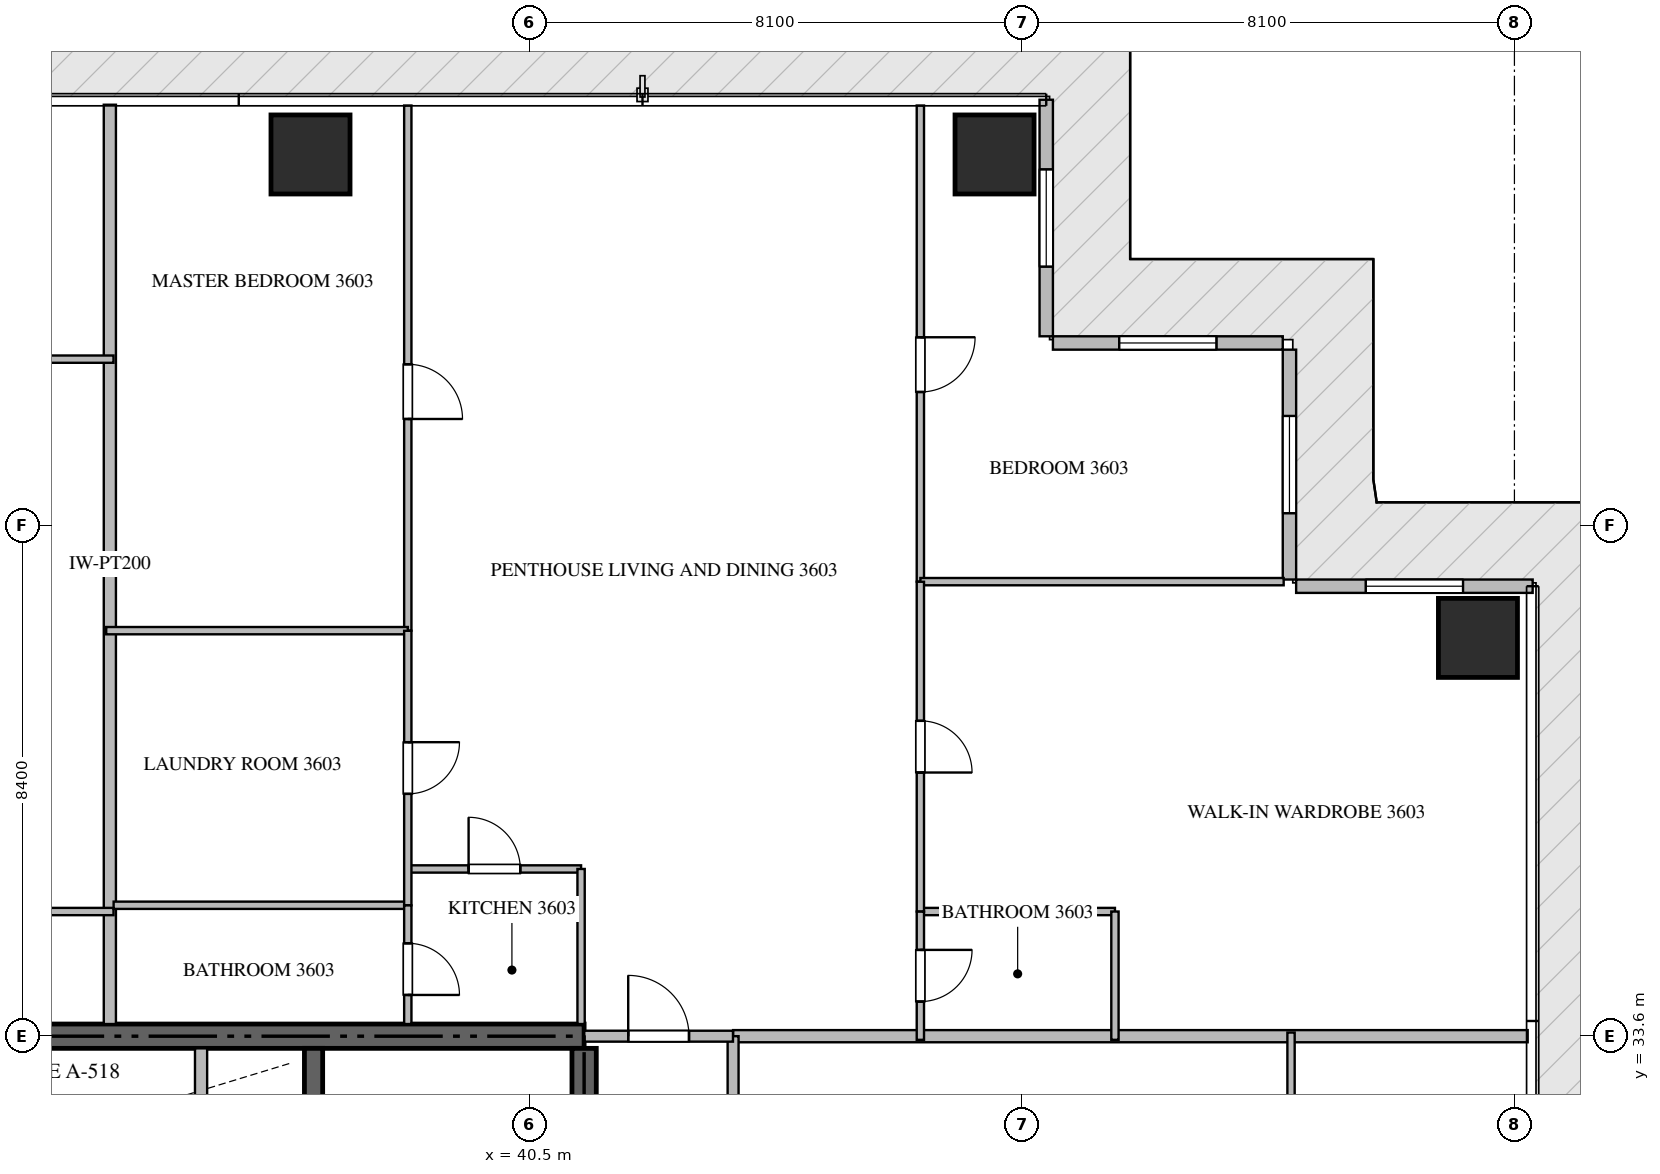
"""IFC4 building model, lengths in metres.
Left out: names, types, materials, properties, quantities, classifications, styles, units other than length and angle.
Written with IfcOpenShell. Run it as: python <this file> out.ifc"""

import sys

from ifc_helpers import new_model, si_unit, direction, frame, frame_2d, origin, origin_2d, place, context, subcontext, project, spatial, rectangle, extrude, source, transform, mapped, element, fill, save


model = new_model("IFC4")
c1 = context("Model", 3, precision=1e-05, world=origin(), true_north=direction((0.0, 1.0)))
c2 = subcontext(c1, "Body", "Model", "MODEL_VIEW")
j1 = project(units=[si_unit("LENGTHUNIT", "METRE"), si_unit("PLANEANGLEUNIT", "RADIAN")], contexts=[c1])
p1 = place(None, origin())
s1 = spatial("IfcSite", under=j1, at=p1, CompositionType="ELEMENT")
p2 = place(p1, origin())
s2 = spatial("IfcBuilding", under=s1, at=p2, CompositionType="ELEMENT")
p3 = place(p2, frame((0.0, 0.0, 146.4)))
s3 = spatial("IfcBuildingStorey", under=s2, at=p3, CompositionType="ELEMENT", Elevation=146.4)
p4 = place(p3, frame((41.4, 33.6, -0.26), z_axis=(0.0, 0.0, 1.0), x_axis=(-1.0, 0.0, 0.0)))
e1 = element("IfcWall", 1, at=p4, inside=s3, PredefinedType="SHEAR", context=c2, shape_type="SweptSolid", body=[
    extrude(rectangle(XDim=18.0, YDim=0.4, at=frame_2d((9.0, 0.0))), origin(), (0.0, 0.0, 1.0), 3.748),
])
p5 = place(p3, frame((41.4, 27.75, -0.26), z_axis=(0.0, 0.0, 1.0), x_axis=(0.0, 1.0, 0.0)))
e2 = element("IfcWall", 2, at=p5, inside=s3, PredefinedType="SHEAR", context=c2, shape_type="SweptSolid", body=[
    extrude(rectangle(XDim=5.65, YDim=0.4, at=frame_2d((2.825, 0.0))), origin(), (0.0, 0.0, 1.0), 3.748),
])
p6 = place(p3, frame((36.95, 27.05, -0.26), z_axis=(0.0, 0.0, 1.0), x_axis=(0.0, 1.0, 0.0)))
e3 = element("IfcWall", 3, at=p6, inside=s3, PredefinedType="SHEAR", context=c2, shape_type="SweptSolid", body=[
    extrude(rectangle(XDim=6.35, YDim=0.3, at=frame_2d((3.175, 0.0))), origin(), (0.0, 0.0, 1.0), 3.748),
])
m1 = source(origin(), c2, "Body", "SweptSolid", [
    extrude(rectangle(XDim=1.3, YDim=1.3, at=origin_2d()), origin(), (0.0, 0.0, 1.0), 3.75),
])
for number, where, z_axis, x_axis in (
    (4, (36.9, 48.1, -0.26), (0.0, 0.0, 1.0), (1.0, 0.0, 0.0)),
    (5, (48.15, 48.1, -0.26), (0.0, 0.0, 1.0), (1.0, 0.0, 0.0)),
    (6, (56.1, 40.15, -0.26), (0.0, 0.0, 1.0), (1.0, 0.0, 0.0)),
):
    element("IfcColumn", number, at=place(p3, frame(where, z_axis=z_axis, x_axis=x_axis)), inside=s3, PredefinedType="COLUMN", context=c2, shape_type="MappedRepresentation", body=[
        mapped(m1, transform((0.0, 0.0, 0.0), scale=1.0)),
    ])
p7 = place(p3, frame((57.0, 41.0, 0.0), z_axis=(0.0, 0.0, 1.0), x_axis=(-1.0, 0.0, 0.0)))
e7 = element("IfcWall", 7, at=p7, inside=s3, PredefinedType="ELEMENTEDWALL", context=c2, shape_type="SweptSolid", body=[
    extrude(rectangle(XDim=3.89, YDim=0.22, at=frame_2d((1.945, 0.0))), origin(), (0.0, 0.0, 1.0), 3.475),
])
p8 = place(p7, frame((1.145, 0.0, 0.65)))
e8 = element("IfcOpeningElement", 8, at=p8, cuts=e7, PredefinedType="OPENING", context=c2, shape_type="SweptSolid", body=[
    extrude(rectangle(XDim=1.6, YDim=2.1, at=frame_2d((0.8, 1.05))), frame((0.0, 0.12, 0.0), z_axis=(0.0, -1.0, 0.0), x_axis=(1.0, 0.0, 0.0)), (0.0, 0.0, 1.0), 0.24),
])
p9 = place(p3, frame((53.0, 41.11, 0.0), z_axis=(0.0, 0.0, 1.0), x_axis=(0.0, 1.0, 0.0)))
e9 = element("IfcWall", 9, at=p9, inside=s3, PredefinedType="ELEMENTEDWALL", context=c2, shape_type="SweptSolid", body=[
    extrude(rectangle(XDim=3.78, YDim=0.22, at=frame_2d((1.89, 0.0))), origin(), (0.0, 0.0, 1.0), 3.475),
])
p10 = place(p9, frame((1.09, 0.0, 0.65)))
e10 = element("IfcOpeningElement", 10, at=p10, cuts=e9, PredefinedType="OPENING", context=c2, shape_type="SweptSolid", body=[
    extrude(rectangle(XDim=1.6, YDim=2.1, at=frame_2d((0.8, 1.05))), frame((0.0, 0.12, 0.0), z_axis=(0.0, -1.0, 0.0), x_axis=(1.0, 0.0, 0.0)), (0.0, 0.0, 1.0), 0.24),
])
p11 = place(p3, frame((52.89, 45.0, 0.0), z_axis=(0.0, 0.0, 1.0), x_axis=(-1.0, 0.0, 0.0)))
e11 = element("IfcWall", 11, at=p11, inside=s3, PredefinedType="ELEMENTEDWALL", context=c2, shape_type="SweptSolid", body=[
    extrude(rectangle(XDim=3.78, YDim=0.22, at=frame_2d((1.89, 0.0))), origin(), (0.0, 0.0, 1.0), 3.475),
])
p12 = place(p11, frame((1.09, 0.0, 0.65)))
e12 = element("IfcOpeningElement", 12, at=p12, cuts=e11, PredefinedType="OPENING", context=c2, shape_type="SweptSolid", body=[
    extrude(rectangle(XDim=1.6, YDim=2.1, at=frame_2d((0.8, 1.05))), frame((0.0, 0.12, 0.0), z_axis=(0.0, -1.0, 0.0), x_axis=(1.0, 0.0, 0.0)), (0.0, 0.0, 1.0), 0.24),
])
p13 = place(p3, frame((49.0, 45.11, 0.0), z_axis=(0.0, 0.0, 1.0), x_axis=(0.0, 1.0, 0.0)))
e13 = element("IfcWall", 13, at=p13, inside=s3, PredefinedType="ELEMENTEDWALL", context=c2, shape_type="SweptSolid", body=[
    extrude(rectangle(XDim=3.89, YDim=0.22, at=frame_2d((1.945, 0.0))), origin(), (0.0, 0.0, 1.0), 3.475),
])
p14 = place(p13, frame((1.145, 0.0, 0.65)))
e14 = element("IfcOpeningElement", 14, at=p14, cuts=e13, PredefinedType="OPENING", context=c2, shape_type="SweptSolid", body=[
    extrude(rectangle(XDim=1.6, YDim=2.1, at=frame_2d((0.8, 1.05))), frame((0.0, 0.12, 0.0), z_axis=(0.0, -1.0, 0.0), x_axis=(1.0, 0.0, 0.0)), (0.0, 0.0, 1.0), 0.24),
])
p15 = place(p3, frame((35.1, 30.75, 0.0), z_axis=(0.0, 0.0, 1.0), x_axis=(0.0, 1.0, 0.0)))
e15 = element("IfcWall", 15, at=p15, inside=s3, PredefinedType="STANDARD", context=c2, shape_type="SweptSolid", body=[
    extrude(rectangle(XDim=2.65, YDim=0.2, at=frame_2d((1.325, 0.0))), origin(), (0.0, 0.0, 1.0), 3.49),
])
p16 = place(p3, frame((33.6, 33.8, 0.0), z_axis=(0.0, 0.0, 1.0), x_axis=(0.0, 1.0, 0.0)))
e16 = element("IfcWall", 16, at=p16, inside=s3, PredefinedType="PARTITIONING", context=c2, shape_type="SweptSolid", body=[
    extrude(rectangle(XDim=15.118, YDim=0.2, at=frame_2d((7.559, 0.0))), origin(), (0.0, 0.0, 1.0), 3.49),
])
p17 = place(p3, frame((43.85, 33.6, 0.0), z_axis=(0.0, 0.0, 1.0), x_axis=(1.0, 0.0, 0.0)))
e17 = element("IfcWall", 17, at=p17, inside=s3, PredefinedType="PARTITIONING", context=c2, shape_type="SweptSolid", body=[
    extrude(rectangle(XDim=13.068, YDim=0.2, at=frame_2d((6.534, 0.0))), origin(), (0.0, 0.0, 1.0), 3.49),
])
p18 = place(p3, frame((43.85, 14.9, 0.0), z_axis=(0.0, 0.0, 1.0), x_axis=(0.0, 1.0, 0.0)))
e18 = element("IfcWall", 18, at=p18, inside=s3, PredefinedType="PARTITIONING", context=c2, shape_type="SweptSolid", body=[
    extrude(rectangle(XDim=18.7, YDim=0.18, at=frame_2d((9.35, 0.0))), origin(), (0.0, 0.0, 1.0), 3.49),
])
p19 = place(p18, frame((1.805, 0.0, 0.0)))
e19 = element("IfcOpeningElement", 19, at=p19, cuts=e18, PredefinedType="OPENING", context=c2, shape_type="SweptSolid", body=[
    extrude(rectangle(XDim=1.0, YDim=2.15, at=frame_2d((0.5, 1.075))), frame((0.0, 0.1, 0.0), z_axis=(0.0, -1.0, 0.0), x_axis=(1.0, 0.0, 0.0)), (0.0, 0.0, 1.0), 0.2),
])
p20 = place(p3, frame((41.402, 33.6, 0.0), z_axis=(0.0, 0.0, 1.0), x_axis=(1.0, 0.0, 0.0)))
e20 = element("IfcWall", 20, at=p20, inside=s3, PredefinedType="PARTITIONING", context=c2, shape_type="SweptSolid", body=[
    extrude(rectangle(XDim=2.446, YDim=0.18, at=frame_2d((1.223, 0.0))), origin(), (0.0, 0.0, 1.0), 3.49),
])
p21 = place(p20, frame((0.723, 0.0, 0.0)))
e21 = element("IfcOpeningElement", 21, at=p21, cuts=e20, PredefinedType="OPENING", context=c2, shape_type="SweptSolid", body=[
    extrude(rectangle(XDim=1.0, YDim=2.15, at=frame_2d((0.5, 1.075))), frame((0.0, 0.1, 0.0), z_axis=(0.0, -1.0, 0.0), x_axis=(1.0, 0.0, 0.0)), (0.0, 0.0, 1.0), 0.2),
])
for number, where, z_axis, x_axis in (
    (22, (26.3, 44.734, 0.0), (0.0, 0.0, 1.0), (1.0, 0.0, 0.0)),
    (23, (26.3, 35.65, 0.0), (0.0, 0.0, 1.0), (1.0, 0.0, 0.0)),
):
    element("IfcWall", number, at=place(p3, frame(where, z_axis=z_axis, x_axis=x_axis)), inside=s3, PredefinedType="PARTITIONING", context=c2, shape_type="SweptSolid", body=[
        extrude(rectangle(XDim=7.36, YDim=0.12, at=frame_2d((3.68, 0.0))), origin(), (0.0, 0.0, 1.0), 3.49),
    ])
p22 = place(p3, frame((38.5, 36.35, 0.0), z_axis=(0.0, 0.0, 1.0), x_axis=(1.0, 0.0, 0.0)))
e24 = element("IfcWall", 24, at=p22, inside=s3, PredefinedType="PARTITIONING", context=c2, shape_type="SweptSolid", body=[
    extrude(rectangle(XDim=2.85, YDim=0.12, at=frame_2d((1.425, 0.0))), origin(), (0.0, 0.0, 1.0), 3.49),
])
p23 = place(p22, frame((1.0, 0.0, 0.0)))
e25 = element("IfcOpeningElement", 25, at=p23, cuts=e24, PredefinedType="OPENING", context=c2, shape_type="SweptSolid", body=[
    extrude(rectangle(XDim=0.85, YDim=2.1, at=frame_2d((0.425, 1.05))), frame((0.0, 0.07, 0.0), z_axis=(0.0, -1.0, 0.0), x_axis=(1.0, 0.0, 0.0)), (0.0, 0.0, 1.0), 0.14),
])
p24 = place(p3, frame((41.35, 36.35, 0.0), z_axis=(0.0, 0.0, 1.0), x_axis=(0.0, -1.0, 0.0)))
e26 = element("IfcWall", 26, at=p24, inside=s3, PredefinedType="PARTITIONING", context=c2, shape_type="SweptSolid", body=[
    extrude(rectangle(XDim=2.55, YDim=0.12, at=frame_2d((1.275, 0.0))), origin(), (0.0, 0.0, 1.0), 3.49),
])
p25 = place(p3, frame((38.5, 48.905, 0.0), z_axis=(0.0, 0.0, 1.0), x_axis=(0.0, -1.0, 0.0)))
e27 = element("IfcWall", 27, at=p25, inside=s3, PredefinedType="PARTITIONING", context=c2, shape_type="SweptSolid", body=[
    extrude(rectangle(XDim=8.636, YDim=0.12, at=frame_2d((4.318, 0.0))), origin(), (0.0, 0.0, 1.0), 3.49),
])
p26 = place(p25, frame((4.255, 0.0, 0.0)))
e28 = element("IfcOpeningElement", 28, at=p26, cuts=e27, PredefinedType="OPENING", context=c2, shape_type="SweptSolid", body=[
    extrude(rectangle(XDim=0.9, YDim=2.1, at=frame_2d((0.45, 1.05))), frame((0.0, 0.07, 0.0), z_axis=(0.0, -1.0, 0.0), x_axis=(1.0, 0.0, 0.0)), (0.0, 0.0, 1.0), 0.14),
])
p27 = place(p3, frame((33.54, 40.269, 0.0), z_axis=(0.0, 0.0, 1.0), x_axis=(1.0, 0.0, 0.0)))
e29 = element("IfcWall", 29, at=p27, inside=s3, PredefinedType="PARTITIONING", context=c2, shape_type="SweptSolid", body=[
    extrude(rectangle(XDim=4.96, YDim=0.12, at=frame_2d((2.48, 0.0))), origin(), (0.0, 0.0, 1.0), 2.972),
])
p28 = place(p3, frame((33.662, 35.753, 0.0), z_axis=(0.0, 0.0, 1.0), x_axis=(1.0, 0.0, 0.0)))
e30 = element("IfcWall", 30, at=p28, inside=s3, PredefinedType="PARTITIONING", context=c2, shape_type="SweptSolid", body=[
    extrude(rectangle(XDim=4.838, YDim=0.12, at=frame_2d((2.419, 0.0))), origin(), (0.0, 0.0, 1.0), 3.49),
])
p29 = place(p3, frame((38.5, 40.267, 0.0), z_axis=(0.0, 0.0, 1.0), x_axis=(0.0, -1.0, 0.0)))
e31 = element("IfcWall", 31, at=p29, inside=s3, PredefinedType="PARTITIONING", context=c2, shape_type="SweptSolid", body=[
    extrude(rectangle(XDim=4.514, YDim=0.12, at=frame_2d((2.257, 0.0))), origin(), (0.0, 0.0, 1.0), 3.49),
])
p30 = place(p29, frame((1.832, 0.0, 0.0)))
e32 = element("IfcOpeningElement", 32, at=p30, cuts=e31, PredefinedType="OPENING", context=c2, shape_type="SweptSolid", body=[
    extrude(rectangle(XDim=0.85, YDim=2.1, at=frame_2d((0.425, 1.05))), frame((0.0, 0.07, 0.0), z_axis=(0.0, -1.0, 0.0), x_axis=(1.0, 0.0, 0.0)), (0.0, 0.0, 1.0), 0.14),
])
p31 = place(p3, frame((38.5, 35.751, 0.0), z_axis=(0.0, 0.0, 1.0), x_axis=(0.0, -1.0, 0.0)))
e33 = element("IfcWall", 33, at=p31, inside=s3, PredefinedType="PARTITIONING", context=c2, shape_type="SweptSolid", body=[
    extrude(rectangle(XDim=1.951, YDim=0.12, at=frame_2d((0.976, 0.0))), origin(), (0.0, 0.0, 1.0), 3.49),
])
p32 = place(p31, frame((0.623, 0.0, 0.0)))
e34 = element("IfcOpeningElement", 34, at=p32, cuts=e33, PredefinedType="OPENING", context=c2, shape_type="SweptSolid", body=[
    extrude(rectangle(XDim=0.85, YDim=2.1, at=frame_2d((0.425, 1.05))), frame((0.0, 0.07, 0.0), z_axis=(0.0, -1.0, 0.0), x_axis=(1.0, 0.0, 0.0)), (0.0, 0.0, 1.0), 0.14),
])
p33 = place(p3, frame((46.93, 48.905, 0.0), z_axis=(0.0, 0.0, 1.0), x_axis=(0.0, -1.0, 0.0)))
e35 = element("IfcWall", 35, at=p33, inside=s3, PredefinedType="PARTITIONING", context=c2, shape_type="SweptSolid", body=[
    extrude(rectangle(XDim=7.83, YDim=0.12, at=frame_2d((3.915, 0.0))), origin(), (0.0, 0.0, 1.0), 3.49),
])
p34 = place(p33, frame((3.811, 0.0, 0.0)))
e36 = element("IfcOpeningElement", 36, at=p34, cuts=e35, PredefinedType="OPENING", context=c2, shape_type="SweptSolid", body=[
    extrude(rectangle(XDim=0.9, YDim=2.1, at=frame_2d((0.45, 1.05))), frame((0.0, 0.07, 0.0), z_axis=(0.0, -1.0, 0.0), x_axis=(1.0, 0.0, 0.0)), (0.0, 0.0, 1.0), 0.14),
])
p35 = place(p3, frame((46.93, 41.075, 0.0), z_axis=(0.0, 0.0, 1.0), x_axis=(1.0, 0.0, 0.0)))
e37 = element("IfcWall", 37, at=p35, inside=s3, PredefinedType="PARTITIONING", context=c2, shape_type="SweptSolid", body=[
    extrude(rectangle(XDim=5.975, YDim=0.12, at=frame_2d((2.988, 0.0))), origin(), (0.0, 0.0, 1.0), 3.49),
])
p36 = place(p3, frame((46.93, 35.65, 0.0), z_axis=(0.0, 0.0, 1.0), x_axis=(1.0, 0.0, 0.0)))
e38 = element("IfcWall", 38, at=p36, inside=s3, PredefinedType="PARTITIONING", context=c2, shape_type="SweptSolid", body=[
    extrude(rectangle(XDim=3.2, YDim=0.12, at=frame_2d((1.6, 0.0))), origin(), (0.0, 0.0, 1.0), 3.49),
])
p37 = place(p3, frame((50.13, 35.65, 0.0), z_axis=(0.0, 0.0, 1.0), x_axis=(0.0, -1.0, 0.0)))
e39 = element("IfcWall", 39, at=p37, inside=s3, PredefinedType="PARTITIONING", context=c2, shape_type="SweptSolid", body=[
    extrude(rectangle(XDim=2.11, YDim=0.12, at=frame_2d((1.055, 0.0))), origin(), (0.0, 0.0, 1.0), 3.49),
])
p38 = place(p3, frame((46.93, 41.073, 0.0), z_axis=(0.0, 0.0, 1.0), x_axis=(0.0, -1.0, 0.0)))
e40 = element("IfcWall", 40, at=p38, inside=s3, PredefinedType="PARTITIONING", context=c2, shape_type="SweptSolid", body=[
    extrude(rectangle(XDim=5.423, YDim=0.12, at=frame_2d((2.711, 0.0))), origin(), (0.0, 0.0, 1.0), 3.49),
])
p39 = place(p38, frame((2.287, 0.0, 0.0)))
e41 = element("IfcOpeningElement", 41, at=p39, cuts=e40, PredefinedType="OPENING", context=c2, shape_type="SweptSolid", body=[
    extrude(rectangle(XDim=0.85, YDim=2.1, at=frame_2d((0.425, 1.05))), frame((0.0, 0.07, 0.0), z_axis=(0.0, -1.0, 0.0), x_axis=(1.0, 0.0, 0.0)), (0.0, 0.0, 1.0), 0.14),
])
p40 = place(p3, frame((46.93, 35.648, 0.0), z_axis=(0.0, 0.0, 1.0), x_axis=(0.0, -1.0, 0.0)))
e42 = element("IfcWall", 42, at=p40, inside=s3, PredefinedType="PARTITIONING", context=c2, shape_type="SweptSolid", body=[
    extrude(rectangle(XDim=2.108, YDim=0.12, at=frame_2d((1.054, 0.0))), origin(), (0.0, 0.0, 1.0), 3.49),
])
p41 = place(p40, frame((0.629, 0.0, 0.0)))
e43 = element("IfcOpeningElement", 43, at=p41, cuts=e42, PredefinedType="OPENING", context=c2, shape_type="SweptSolid", body=[
    extrude(rectangle(XDim=0.85, YDim=2.1, at=frame_2d((0.425, 1.05))), frame((0.0, 0.07, 0.0), z_axis=(0.0, -1.0, 0.0), x_axis=(1.0, 0.0, 0.0)), (0.0, 0.0, 1.0), 0.14),
])
p42 = place(p3, frame((53.026, 22.6, 0.0), z_axis=(0.0, 0.0, 1.0), x_axis=(0.0, 1.0, 0.0)))
e44 = element("IfcWall", 44, at=p42, inside=s3, PredefinedType="PARTITIONING", context=c2, shape_type="SweptSolid", body=[
    extrude(rectangle(XDim=11.06, YDim=0.12, at=frame_2d((5.53, 0.0))), origin(), (0.0, 0.0, 1.0), 3.49),
])
m2 = source(origin(), c2, "Body", "SweptSolid", [
    extrude(rectangle(XDim=1.6, YDim=2.1, at=frame_2d((0.8, 1.05))), frame((0.0, 0.03, 0.0), z_axis=(0.0, -1.0, 0.0), x_axis=(1.0, 0.0, 0.0)), (0.0, 0.0, 1.0), 0.06),
])
p43 = place(p8, origin())
e45 = element("IfcWindow", 45, at=p43, inside=s3, PartitioningType="SINGLE_PANEL", PredefinedType="WINDOW", context=c2, shape_type="MappedRepresentation", body=[
    mapped(m2, transform((0.0, 0.0, 0.0), scale=1.0)),
])
fill(e8, e45)
p44 = place(p10, origin())
e46 = element("IfcWindow", 46, at=p44, inside=s3, PartitioningType="SINGLE_PANEL", PredefinedType="WINDOW", context=c2, shape_type="MappedRepresentation", body=[
    mapped(m2, transform((0.0, 0.0, 0.0), scale=1.0)),
])
fill(e10, e46)
p45 = place(p12, origin())
e47 = element("IfcWindow", 47, at=p45, inside=s3, PartitioningType="SINGLE_PANEL", PredefinedType="WINDOW", context=c2, shape_type="MappedRepresentation", body=[
    mapped(m2, transform((0.0, 0.0, 0.0), scale=1.0)),
])
fill(e12, e47)
p46 = place(p14, origin())
e48 = element("IfcWindow", 48, at=p46, inside=s3, PartitioningType="SINGLE_PANEL", PredefinedType="WINDOW", context=c2, shape_type="MappedRepresentation", body=[
    mapped(m2, transform((0.0, 0.0, 0.0), scale=1.0)),
])
fill(e14, e48)
m3 = source(origin(), c2, "Body", "SweptSolid", [
    extrude(rectangle(XDim=1.0, YDim=2.15, at=frame_2d((0.5, 1.075))), frame((0.0, 0.025, 0.0), z_axis=(0.0, -1.0, 0.0), x_axis=(1.0, 0.0, 0.0)), (0.0, 0.0, 1.0), 0.05),
])
p47 = place(p21, origin())
e49 = element("IfcDoor", 49, at=p47, inside=s3, OperationType="SINGLE_SWING_LEFT", PredefinedType="DOOR", context=c2, shape_type="MappedRepresentation", body=[
    mapped(m3, transform((0.0, 0.0, 0.0), scale=1.0)),
])
fill(e21, e49)
m4 = source(origin(), c2, "Body", "SweptSolid", [
    extrude(rectangle(XDim=0.85, YDim=2.1, at=frame_2d((0.425, 1.05))), frame((0.0, 0.025, 0.0), z_axis=(0.0, -1.0, 0.0), x_axis=(1.0, 0.0, 0.0)), (0.0, 0.0, 1.0), 0.05),
])
p48 = place(p23, origin())
e50 = element("IfcDoor", 50, at=p48, inside=s3, OperationType="SINGLE_SWING_LEFT", PredefinedType="DOOR", context=c2, shape_type="MappedRepresentation", body=[
    mapped(m4, transform((0.0, 0.0, 0.0), scale=1.0)),
])
fill(e25, e50)
m5 = source(origin(), c2, "Body", "SweptSolid", [
    extrude(rectangle(XDim=0.9, YDim=2.1, at=frame_2d((0.45, 1.05))), frame((0.0, 0.025, 0.0), z_axis=(0.0, -1.0, 0.0), x_axis=(1.0, 0.0, 0.0)), (0.0, 0.0, 1.0), 0.05),
])
p49 = place(p26, origin())
e51 = element("IfcDoor", 51, at=p49, inside=s3, OperationType="SINGLE_SWING_RIGHT", PredefinedType="DOOR", context=c2, shape_type="MappedRepresentation", body=[
    mapped(m5, transform((0.0, 0.0, 0.0), scale=1.0)),
])
fill(e28, e51)
p50 = place(p30, origin())
e52 = element("IfcDoor", 52, at=p50, inside=s3, OperationType="SINGLE_SWING_LEFT", PredefinedType="DOOR", context=c2, shape_type="MappedRepresentation", body=[
    mapped(m4, transform((0.0, 0.0, 0.0), scale=1.0)),
])
fill(e32, e52)
p51 = place(p32, origin())
e53 = element("IfcDoor", 53, at=p51, inside=s3, OperationType="SINGLE_SWING_RIGHT", PredefinedType="DOOR", context=c2, shape_type="MappedRepresentation", body=[
    mapped(m4, transform((0.0, 0.0, 0.0), scale=1.0)),
])
fill(e34, e53)
p52 = place(p34, origin())
e54 = element("IfcDoor", 54, at=p52, inside=s3, OperationType="SINGLE_SWING_LEFT", PredefinedType="DOOR", context=c2, shape_type="MappedRepresentation", body=[
    mapped(m5, transform((0.0, 0.0, 0.0), scale=1.0)),
])
fill(e36, e54)
p53 = place(p39, origin())
e55 = element("IfcDoor", 55, at=p53, inside=s3, OperationType="SINGLE_SWING_RIGHT", PredefinedType="DOOR", context=c2, shape_type="MappedRepresentation", body=[
    mapped(m4, transform((0.0, 0.0, 0.0), scale=1.0)),
])
fill(e41, e55)
p54 = place(p41, origin())
e56 = element("IfcDoor", 56, at=p54, inside=s3, OperationType="SINGLE_SWING_LEFT", PredefinedType="DOOR", context=c2, shape_type="MappedRepresentation", body=[
    mapped(m4, transform((0.0, 0.0, 0.0), scale=1.0)),
])
fill(e43, e56)
save(model, sys.argv[1])
